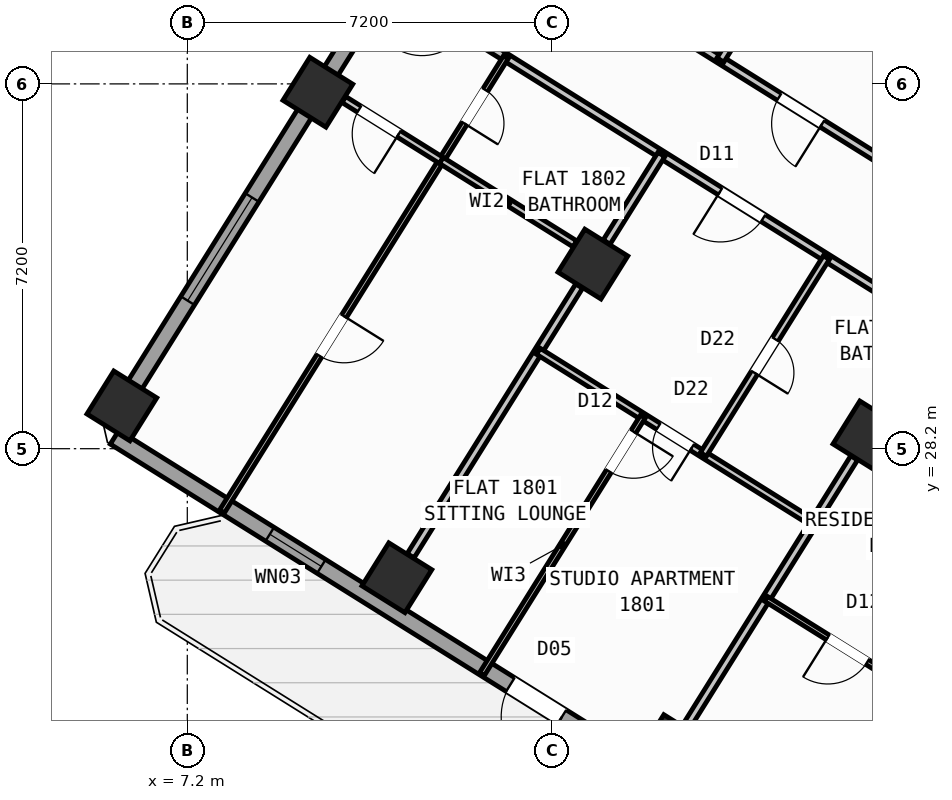
"""IFC4 building model, lengths in metres.
Left out: names, types, materials, properties, quantities, classifications, styles, units other than length and angle.
Written with IfcOpenShell. Run it as: python <this file> out.ifc"""

import sys

from ifc_helpers import new_model, si_unit, direction, frame, frame_2d, origin, origin_2d, place, context, subcontext, project, spatial, rectangle, hollow_rectangle, extrude, source, transform, mapped, element, fill, save


model = new_model("IFC4")
c1 = context("Model", 3, precision=1e-05, world=origin(), true_north=direction((0.0, 1.0)))
c2 = subcontext(c1, "Body", "Model", "MODEL_VIEW")
j1 = project(units=[si_unit("LENGTHUNIT", "METRE"), si_unit("PLANEANGLEUNIT", "RADIAN")], contexts=[c1])
p1 = place(None, origin())
s1 = spatial("IfcSite", under=j1, at=p1, CompositionType="ELEMENT")
p2 = place(p1, origin())
s2 = spatial("IfcBuilding", under=s1, at=p2, CompositionType="ELEMENT")
p3 = place(p2, frame((0.0, 0.0, 71.7)))
s3 = spatial("IfcBuildingStorey", under=s2, at=p3, CompositionType="ELEMENT", Elevation=71.7)
m1 = source(origin(), c2, "Body", "SweptSolid", [
    extrude(hollow_rectangle(XDim=1.0, YDim=1.0, WallThickness=0.04, at=origin_2d()), origin(), (0.0, 0.0, 1.0), 4.8),
])
for number, where, z_axis, x_axis in (
    (1, (20.632, 28.452, 0.0), (0.0, 0.0, 1.0), (-0.848, 0.53, 0.0)),
    (2, (16.764, 22.261, 0.0), (0.0, 0.0, 1.0), (-0.848, 0.53, 0.0)),
    (3, (15.205, 31.844, 0.0), (0.0, 0.0, 1.0), (-0.848, 0.53, 0.0)),
    (4, (11.336, 25.653, 0.0), (0.0, 0.0, 1.0), (-0.848, 0.53, 0.0)),
    (5, (9.777, 35.235, 0.0), (0.0, 0.0, 1.0), (-0.848, 0.53, 0.0)),
    (6, (5.909, 29.044, 0.0), (0.0, 0.0, 1.0), (-0.848, 0.53, 0.0)),
):
    element("IfcColumn", number, at=place(p3, frame(where, z_axis=z_axis, x_axis=x_axis)), inside=s3, PredefinedType="COLUMN", context=c2, shape_type="MappedRepresentation", body=[
        mapped(m1, transform((0.0, 0.0, 0.0), scale=1.0)),
    ])
p4 = place(p3, frame((31.76, 12.183, 0.0), z_axis=(0.0, 0.0, 1.0), x_axis=(-0.848047074256, 0.529920899612, 0.0)))
e7 = element("IfcWall", 7, at=p4, inside=s3, PredefinedType="STANDARD", context=c2, shape_type="SweptSolid", body=[
    extrude(rectangle(XDim=30.652, YDim=0.32, at=frame_2d((15.326, 0.0))), origin(), (0.0, 0.0, 1.0), 4.52),
])
p5 = place(p4, frame((20.241, 0.0, 0.0)))
e8 = element("IfcOpeningElement", 8, at=p5, cuts=e7, PredefinedType="OPENING", context=c2, shape_type="SweptSolid", body=[
    extrude(rectangle(XDim=1.2, YDim=2.15, at=frame_2d((0.6, 1.075))), frame((0.0, 0.17, 0.0), z_axis=(0.0, -1.0, 0.0), x_axis=(1.0, 0.0, 0.0)), (0.0, 0.0, 1.0), 0.34),
])
p6 = place(p4, frame((14.781, 0.0, 0.0)))
e9 = element("IfcOpeningElement", 9, at=p6, cuts=e7, PredefinedType="OPENING", context=c2, shape_type="SweptSolid", body=[
    extrude(rectangle(XDim=1.5, YDim=2.25, at=frame_2d((0.75, 1.125))), frame((0.0, 0.17, 0.0), z_axis=(0.0, -1.0, 0.0), x_axis=(1.0, 0.0, 0.0)), (0.0, 0.0, 1.0), 0.34),
])
p7 = place(p4, frame((1.84, 0.0, 0.75)))
e10 = element("IfcOpeningElement", 10, at=p7, cuts=e7, PredefinedType="OPENING", context=c2, shape_type="SweptSolid", body=[
    extrude(rectangle(XDim=2.4, YDim=1.6, at=frame_2d((1.2, 0.8))), frame((0.0, 0.17, 0.0), z_axis=(0.0, -1.0, 0.0), x_axis=(1.0, 0.0, 0.0)), (0.0, 0.0, 1.0), 0.34),
])
p8 = place(p4, frame((7.019, 0.0, 0.75)))
e11 = element("IfcOpeningElement", 11, at=p8, cuts=e7, PredefinedType="OPENING", context=c2, shape_type="SweptSolid", body=[
    extrude(rectangle(XDim=2.4, YDim=1.6, at=frame_2d((1.2, 0.8))), frame((0.0, 0.17, 0.0), z_axis=(0.0, -1.0, 0.0), x_axis=(1.0, 0.0, 0.0)), (0.0, 0.0, 1.0), 0.34),
])
p9 = place(p4, frame((25.841, 0.0, 0.95)))
e12 = element("IfcOpeningElement", 12, at=p9, cuts=e7, PredefinedType="OPENING", context=c2, shape_type="SweptSolid", body=[
    extrude(rectangle(XDim=1.2, YDim=1.4, at=frame_2d((0.6, 0.7))), frame((0.0, 0.17, 0.0), z_axis=(0.0, -1.0, 0.0), x_axis=(1.0, 0.0, 0.0)), (0.0, 0.0, 1.0), 0.34),
])
p10 = place(p3, frame((5.7, 28.71, 0.0), z_axis=(0.0, 0.0, 1.0), x_axis=(0.529923711467, 0.8480453172, 0.0)))
e13 = element("IfcWall", 13, at=p10, inside=s3, PredefinedType="STANDARD", context=c2, shape_type="SweptSolid", body=[
    extrude(rectangle(XDim=21.587, YDim=0.32, at=frame_2d((10.794, 0.0))), origin(), (0.0, 0.0, 1.0), 3.895),
])
p11 = place(p10, frame((2.844, 0.0, 0.75)))
e14 = element("IfcOpeningElement", 14, at=p11, cuts=e13, PredefinedType="OPENING", context=c2, shape_type="SweptSolid", body=[
    extrude(rectangle(XDim=2.4, YDim=1.6, at=frame_2d((1.2, 0.8))), frame((0.0, 0.17, 0.0), z_axis=(0.0, -1.0, 0.0), x_axis=(1.0, 0.0, 0.0)), (0.0, 0.0, 1.0), 0.34),
])
p12 = place(p3, frame((17.424, 47.083, 0.0), z_axis=(0.0, 0.0, 1.0), x_axis=(0.848049927979, -0.529916332693, 0.0)))
e15 = element("IfcWall", 15, at=p12, inside=s3, PredefinedType="STANDARD", context=c2, shape_type="SweptSolid", body=[
    extrude(rectangle(XDim=29.223, YDim=0.32, at=frame_2d((14.612, 0.0))), origin(), (0.0, 0.0, 1.0), 4.52),
])
p13 = place(p12, frame((3.339, 0.0, 0.0)))
e16 = element("IfcOpeningElement", 16, at=p13, cuts=e15, PredefinedType="OPENING", context=c2, shape_type="SweptSolid", body=[
    extrude(rectangle(XDim=1.05, YDim=2.15, at=frame_2d((0.525, 1.075))), frame((0.0, 0.17, 0.0), z_axis=(0.0, -1.0, 0.0), x_axis=(1.0, 0.0, 0.0)), (0.0, 0.0, 1.0), 0.34),
])
p14 = place(p12, frame((8.194, 0.0, 0.75)))
e17 = element("IfcOpeningElement", 17, at=p14, cuts=e15, PredefinedType="OPENING", context=c2, shape_type="SweptSolid", body=[
    extrude(rectangle(XDim=2.4, YDim=1.6, at=frame_2d((1.2, 0.8))), frame((0.0, 0.17, 0.0), z_axis=(0.0, -1.0, 0.0), x_axis=(1.0, 0.0, 0.0)), (0.0, 0.0, 1.0), 0.34),
])
p15 = place(p12, frame((22.226, 0.0, 0.85)))
e18 = element("IfcOpeningElement", 18, at=p15, cuts=e15, PredefinedType="OPENING", context=c2, shape_type="SweptSolid", body=[
    extrude(rectangle(XDim=1.8, YDim=1.5, at=frame_2d((0.9, 0.75))), frame((0.0, 0.17, 0.0), z_axis=(0.0, -1.0, 0.0), x_axis=(1.0, 0.0, 0.0)), (0.0, 0.0, 1.0), 0.34),
])
p16 = place(p12, frame((26.934, 0.0, 0.95)))
e19 = element("IfcOpeningElement", 19, at=p16, cuts=e15, PredefinedType="OPENING", context=c2, shape_type="SweptSolid", body=[
    extrude(rectangle(XDim=1.2, YDim=1.4, at=frame_2d((0.6, 0.7))), frame((0.0, 0.17, 0.0), z_axis=(0.0, -1.0, 0.0), x_axis=(1.0, 0.0, 0.0)), (0.0, 0.0, 1.0), 0.34),
])
p17 = place(p12, frame((14.636, 0.0, 1.0)))
e20 = element("IfcOpeningElement", 20, at=p17, cuts=e15, PredefinedType="OPENING", context=c2, shape_type="SweptSolid", body=[
    extrude(rectangle(XDim=0.9, YDim=1.25, at=frame_2d((0.45, 0.625))), frame((0.0, 0.17, 0.0), z_axis=(0.0, -1.0, 0.0), x_axis=(1.0, 0.0, 0.0)), (0.0, 0.0, 1.0), 0.34),
])
p18 = place(p3, frame((25.198, 28.606, 0.0), z_axis=(0.0, 0.0, 1.0), x_axis=(-0.529926497642, -0.848043576178, 0.0)))
e21 = element("IfcWall", 21, at=p18, inside=s3, PredefinedType="PARTITIONING", context=c2, shape_type="SweptSolid", body=[
    extrude(rectangle(XDim=10.3, YDim=0.16, at=frame_2d((5.15, 0.0))), origin(), (0.0, 0.0, 1.0), 4.51),
])
p19 = place(p3, frame((26.363, 30.472, 0.0), z_axis=(0.0, 0.0, 1.0), x_axis=(-0.848052408131, 0.529912363569, 0.0)))
e22 = element("IfcWall", 22, at=p19, inside=s3, PredefinedType="PARTITIONING", context=c2, shape_type="SweptSolid", body=[
    extrude(rectangle(XDim=16.73, YDim=0.16, at=frame_2d((8.365, 0.0))), origin(), (0.0, 0.0, 1.0), 4.51),
])
p20 = place(p19, frame((2.22, 0.0, 0.0)))
e23 = element("IfcOpeningElement", 23, at=p20, cuts=e22, PredefinedType="OPENING", context=c2, shape_type="SweptSolid", body=[
    extrude(rectangle(XDim=0.86, YDim=2.05, at=frame_2d((0.43, 1.025))), frame((0.0, 0.09, 0.0), z_axis=(0.0, -1.0, 0.0), x_axis=(1.0, 0.0, 0.0)), (0.0, 0.0, 1.0), 0.18),
])
p21 = place(p19, frame((7.82, 0.0, 0.0)))
e24 = element("IfcOpeningElement", 24, at=p21, cuts=e22, PredefinedType="OPENING", context=c2, shape_type="SweptSolid", body=[
    extrude(rectangle(XDim=1.0, YDim=2.1, at=frame_2d((0.5, 1.05))), frame((0.0, 0.09, 0.0), z_axis=(0.0, -1.0, 0.0), x_axis=(1.0, 0.0, 0.0)), (0.0, 0.0, 1.0), 0.18),
])
p22 = place(p19, frame((12.95, 0.0, 0.0)))
e25 = element("IfcOpeningElement", 25, at=p22, cuts=e22, PredefinedType="OPENING", context=c2, shape_type="SweptSolid", body=[
    extrude(rectangle(XDim=1.0, YDim=2.1, at=frame_2d((0.5, 1.05))), frame((0.0, 0.09, 0.0), z_axis=(0.0, -1.0, 0.0), x_axis=(1.0, 0.0, 0.0)), (0.0, 0.0, 1.0), 0.18),
])
p23 = place(p3, frame((25.198, 28.606, 0.0), z_axis=(0.0, 0.0, 1.0), x_axis=(-0.848052408131, 0.529912363569, 0.0)))
e26 = element("IfcWall", 26, at=p23, inside=s3, PredefinedType="PARTITIONING", context=c2, shape_type="SweptSolid", body=[
    extrude(rectangle(XDim=16.73, YDim=0.16, at=frame_2d((8.365, 0.0))), origin(), (0.0, 0.0, 1.0), 4.51),
])
p24 = place(p23, frame((1.395, 0.0, 0.0)))
e27 = element("IfcOpeningElement", 27, at=p24, cuts=e26, PredefinedType="OPENING", context=c2, shape_type="SweptSolid", body=[
    extrude(rectangle(XDim=1.0, YDim=2.1, at=frame_2d((0.5, 1.05))), frame((0.0, 0.09, 0.0), z_axis=(0.0, -1.0, 0.0), x_axis=(1.0, 0.0, 0.0)), (0.0, 0.0, 1.0), 0.18),
])
p25 = place(p23, frame((7.82, 0.0, 0.0)))
e28 = element("IfcOpeningElement", 28, at=p25, cuts=e26, PredefinedType="OPENING", context=c2, shape_type="SweptSolid", body=[
    extrude(rectangle(XDim=1.0, YDim=2.1, at=frame_2d((0.5, 1.05))), frame((0.0, 0.09, 0.0), z_axis=(0.0, -1.0, 0.0), x_axis=(1.0, 0.0, 0.0)), (0.0, 0.0, 1.0), 0.18),
])
p26 = place(p23, frame((14.76, 0.0, 0.0)))
e29 = element("IfcOpeningElement", 29, at=p26, cuts=e26, PredefinedType="OPENING", context=c2, shape_type="SweptSolid", body=[
    extrude(rectangle(XDim=1.0, YDim=2.1, at=frame_2d((0.5, 1.05))), frame((0.0, 0.09, 0.0), z_axis=(0.0, -1.0, 0.0), x_axis=(1.0, 0.0, 0.0)), (0.0, 0.0, 1.0), 0.18),
])
p27 = place(p3, frame((20.361, 28.018, 0.0), z_axis=(0.0, 0.0, 1.0), x_axis=(-0.529915015264, -0.848050751193, 0.0)))
e30 = element("IfcWall", 30, at=p27, inside=s3, PredefinedType="PARTITIONING", context=c2, shape_type="SweptSolid", body=[
    extrude(rectangle(XDim=6.276, YDim=0.16, at=frame_2d((3.138, 0.0))), origin(), (0.0, 0.0, 1.0), 3.895),
])
p28 = place(p3, frame((21.837, 23.228, 0.0), z_axis=(0.0, 0.0, 1.0), x_axis=(-0.84803087207, 0.529946827537, 0.0)))
e31 = element("IfcWall", 31, at=p28, inside=s3, PredefinedType="PARTITIONING", context=c2, shape_type="SweptSolid", body=[
    extrude(rectangle(XDim=3.79, YDim=0.11, at=frame_2d((1.895, 0.0))), origin(), (0.0, 0.0, 1.0), 4.51),
])
p29 = place(p28, frame((1.435, 0.0, 0.0)))
e32 = element("IfcOpeningElement", 32, at=p29, cuts=e31, PredefinedType="OPENING", context=c2, shape_type="SweptSolid", body=[
    extrude(rectangle(XDim=0.92, YDim=2.08, at=frame_2d((0.46, 1.04))), frame((0.0, 0.065, 0.0), z_axis=(0.0, -1.0, 0.0), x_axis=(1.0, 0.0, 0.0)), (0.0, 0.0, 1.0), 0.13),
])
p30 = place(p3, frame((16.556, 34.006, 0.0), z_axis=(0.0, 0.0, 1.0), x_axis=(-0.529966635742, -0.848018493313, 0.0)))
e33 = element("IfcWall", 33, at=p30, inside=s3, PredefinedType="PARTITIONING", context=c2, shape_type="SweptSolid", body=[
    extrude(rectangle(XDim=2.038, YDim=0.16, at=frame_2d((1.019, 0.0))), origin(), (0.0, 0.0, 1.0), 3.895),
])
p31 = place(p3, frame((14.933, 31.409, 0.0), z_axis=(0.0, 0.0, 1.0), x_axis=(-0.529897533635, -0.848061674554, 0.0)))
e34 = element("IfcWall", 34, at=p31, inside=s3, PredefinedType="PARTITIONING", context=c2, shape_type="SweptSolid", body=[
    extrude(rectangle(XDim=6.276, YDim=0.16, at=frame_2d((3.138, 0.0))), origin(), (0.0, 0.0, 1.0), 3.895),
])
p32 = place(p3, frame((19.556, 26.73, 0.0), z_axis=(0.0, 0.0, 1.0), x_axis=(-0.848049732085, 0.529916646191, 0.0)))
e35 = element("IfcWall", 35, at=p32, inside=s3, PredefinedType="PLUMBINGWALL", context=c2, shape_type="SweptSolid", body=[
    extrude(rectangle(XDim=6.4, YDim=0.14, at=frame_2d((3.2, 0.0))), origin(), (0.0, 0.0, 1.0), 4.51),
])
p33 = place(p32, frame((2.824, 0.0, 0.0)))
e36 = element("IfcOpeningElement", 36, at=p33, cuts=e35, PredefinedType="OPENING", context=c2, shape_type="SweptSolid", body=[
    extrude(rectangle(XDim=0.78, YDim=2.05, at=frame_2d((0.39, 1.025))), frame((0.0, 0.08, 0.0), z_axis=(0.0, -1.0, 0.0), x_axis=(1.0, 0.0, 0.0)), (0.0, 0.0, 1.0), 0.16),
])
p34 = place(p3, frame((19.812, 31.971, 0.0), z_axis=(0.0, 0.0, 1.0), x_axis=(-0.529917480809, -0.848049210561, 0.0)))
e37 = element("IfcWall", 37, at=p34, inside=s3, PredefinedType="PLUMBINGWALL", context=c2, shape_type="SweptSolid", body=[
    extrude(rectangle(XDim=4.58, YDim=0.14, at=frame_2d((2.29, 0.0))), origin(), (0.0, 0.0, 1.0), 4.51),
])
p35 = place(p34, frame((1.9, 0.0, 0.0)))
e38 = element("IfcOpeningElement", 38, at=p35, cuts=e37, PredefinedType="OPENING", context=c2, shape_type="SweptSolid", body=[
    extrude(rectangle(XDim=0.78, YDim=2.05, at=frame_2d((0.39, 1.025))), frame((0.0, 0.08, 0.0), z_axis=(0.0, -1.0, 0.0), x_axis=(1.0, 0.0, 0.0)), (0.0, 0.0, 1.0), 0.16),
])
p36 = place(p3, frame((16.191, 28.833, 0.0), z_axis=(0.0, 0.0, 1.0), x_axis=(-0.529900017123, -0.848060122782, 0.0)))
e39 = element("IfcWall", 39, at=p36, inside=s3, PredefinedType="PARTITIONING", context=c2, shape_type="SweptSolid", body=[
    extrude(rectangle(XDim=5.99, YDim=0.11, at=frame_2d((2.995, 0.0))), origin(), (0.0, 0.0, 1.0), 4.51),
])
p37 = place(p36, frame((0.35, 0.0, 0.0)))
e40 = element("IfcOpeningElement", 40, at=p37, cuts=e39, PredefinedType="OPENING", context=c2, shape_type="SweptSolid", body=[
    extrude(rectangle(XDim=0.92, YDim=2.08, at=frame_2d((0.46, 1.04))), frame((0.0, 0.065, 0.0), z_axis=(0.0, -1.0, 0.0), x_axis=(1.0, 0.0, 0.0)), (0.0, 0.0, 1.0), 0.13),
])
p38 = place(p3, frame((13.486, 35.924, 0.0), z_axis=(0.0, 0.0, 1.0), x_axis=(-0.529924195719, -0.848045014602, 0.0)))
e41 = element("IfcWall", 41, at=p38, inside=s3, PredefinedType="PARTITIONING", context=c2, shape_type="SweptSolid", body=[
    extrude(rectangle(XDim=10.57, YDim=0.11, at=frame_2d((5.285, 0.0))), origin(), (0.0, 0.0, 1.0), 4.51),
])
p39 = place(p38, frame((0.76, 0.0, 0.0)))
e42 = element("IfcOpeningElement", 42, at=p39, cuts=e41, PredefinedType="OPENING", context=c2, shape_type="SweptSolid", body=[
    extrude(rectangle(XDim=0.78, YDim=2.05, at=frame_2d((0.39, 1.025))), frame((0.0, 0.065, 0.0), z_axis=(0.0, -1.0, 0.0), x_axis=(1.0, 0.0, 0.0)), (0.0, 0.0, 1.0), 0.13),
])
p40 = place(p38, frame((6.025, 0.0, 0.0)))
e43 = element("IfcOpeningElement", 43, at=p40, cuts=e41, PredefinedType="OPENING", context=c2, shape_type="SweptSolid", body=[
    extrude(rectangle(XDim=0.92, YDim=2.08, at=frame_2d((0.46, 1.04))), frame((0.0, 0.065, 0.0), z_axis=(0.0, -1.0, 0.0), x_axis=(1.0, 0.0, 0.0)), (0.0, 0.0, 1.0), 0.13),
])
p41 = place(p3, frame((12.214, 33.889, 0.0), z_axis=(0.0, 0.0, 1.0), x_axis=(-0.848082963347, 0.529863460979, 0.0)))
e44 = element("IfcWall", 44, at=p41, inside=s3, PredefinedType="PLUMBINGWALL", context=c2, shape_type="SweptSolid", body=[
    extrude(rectangle(XDim=2.268, YDim=0.14, at=frame_2d((1.134, 0.0))), origin(), (0.0, 0.0, 1.0), 3.895),
])
p42 = place(p41, frame((0.99, 0.0, 0.0)))
e45 = element("IfcOpeningElement", 45, at=p42, cuts=e44, PredefinedType="OPENING", context=c2, shape_type="SweptSolid", body=[
    extrude(rectangle(XDim=0.92, YDim=2.08, at=frame_2d((0.46, 1.04))), frame((0.0, 0.08, 0.0), z_axis=(0.0, -1.0, 0.0), x_axis=(1.0, 0.0, 0.0)), (0.0, 0.0, 1.0), 0.16),
])
p43 = place(p3, frame((14.85, 32.242, 0.0), z_axis=(0.0, 0.0, 1.0), x_axis=(-0.848051256418, 0.529914206724, 0.0)))
e46 = element("IfcWall", 46, at=p43, inside=s3, PredefinedType="PLUMBINGWALL", context=c2, shape_type="SweptSolid", body=[
    extrude(rectangle(XDim=3.108, YDim=0.14, at=frame_2d((1.554, 0.0))), origin(), (0.0, 0.0, 1.0), 3.895),
])
p44 = place(p3, frame((18.802, 37.6, 0.0), z_axis=(0.0, 0.0, 1.0), x_axis=(-0.529880479764, -0.848072330149, 0.0)))
e47 = element("IfcWall", 47, at=p44, inside=s3, PredefinedType="PARTITIONING", context=c2, shape_type="SweptSolid", body=[
    extrude(rectangle(XDim=2.038, YDim=0.16, at=frame_2d((1.019, 0.0))), origin(), (0.0, 0.0, 1.0), 3.895),
])
m2 = source(origin(), c2, "Body", "SweptSolid", [
    extrude(rectangle(XDim=1.2, YDim=2.15, at=frame_2d((0.6, 1.075))), frame((0.0, 0.025, 0.0), z_axis=(0.0, -1.0, 0.0), x_axis=(1.0, 0.0, 0.0)), (0.0, 0.0, 1.0), 0.05),
])
p45 = place(p5, origin())
e48 = element("IfcDoor", 48, at=p45, inside=s3, OperationType="SINGLE_SWING_LEFT", PredefinedType="DOOR", context=c2, shape_type="MappedRepresentation", body=[
    mapped(m2, transform((0.0, 0.0, 0.0), scale=1.0)),
])
fill(e8, e48)
m3 = source(origin(), c2, "Body", "SweptSolid", [
    extrude(rectangle(XDim=1.2, YDim=1.4, at=frame_2d((0.6, 0.7))), frame((0.0, 0.03, 0.0), z_axis=(0.0, -1.0, 0.0), x_axis=(1.0, 0.0, 0.0)), (0.0, 0.0, 1.0), 0.06),
])
p46 = place(p9, origin())
e49 = element("IfcWindow", 49, at=p46, inside=s3, PartitioningType="SINGLE_PANEL", PredefinedType="WINDOW", context=c2, shape_type="MappedRepresentation", body=[
    mapped(m3, transform((0.0, 0.0, 0.0), scale=1.0)),
])
fill(e12, e49)
m4 = source(origin(), c2, "Body", "SweptSolid", [
    extrude(rectangle(XDim=2.4, YDim=1.6, at=frame_2d((1.2, 0.8))), frame((0.0, 0.03, 0.0), z_axis=(0.0, -1.0, 0.0), x_axis=(1.0, 0.0, 0.0)), (0.0, 0.0, 1.0), 0.06),
])
p47 = place(p11, origin())
e50 = element("IfcWindow", 50, at=p47, inside=s3, PartitioningType="SINGLE_PANEL", PredefinedType="WINDOW", context=c2, shape_type="MappedRepresentation", body=[
    mapped(m4, transform((0.0, 0.0, 0.0), scale=1.0)),
])
fill(e14, e50)
m5 = source(origin(), c2, "Body", "SweptSolid", [
    extrude(rectangle(XDim=0.92, YDim=2.08, at=frame_2d((0.46, 1.04))), frame((0.0, 0.025, 0.0), z_axis=(0.0, -1.0, 0.0), x_axis=(1.0, 0.0, 0.0)), (0.0, 0.0, 1.0), 0.05),
])
p48 = place(p29, origin())
e51 = element("IfcDoor", 51, at=p48, inside=s3, OperationType="SINGLE_SWING_RIGHT", PredefinedType="DOOR", context=c2, shape_type="MappedRepresentation", body=[
    mapped(m5, transform((0.0, 0.0, 0.0), scale=1.0)),
])
fill(e32, e51)
p49 = place(p37, origin())
e52 = element("IfcDoor", 52, at=p49, inside=s3, OperationType="SINGLE_SWING_LEFT", PredefinedType="DOOR", context=c2, shape_type="MappedRepresentation", body=[
    mapped(m5, transform((0.0, 0.0, 0.0), scale=1.0)),
])
fill(e40, e52)
m6 = source(origin(), c2, "Body", "SweptSolid", [
    extrude(rectangle(XDim=1.0, YDim=2.1, at=frame_2d((0.5, 1.05))), frame((0.0, 0.025, 0.0), z_axis=(0.0, -1.0, 0.0), x_axis=(1.0, 0.0, 0.0)), (0.0, 0.0, 1.0), 0.05),
])
p50 = place(p25, origin())
e53 = element("IfcDoor", 53, at=p50, inside=s3, OperationType="SINGLE_SWING_RIGHT", PredefinedType="DOOR", context=c2, shape_type="MappedRepresentation", body=[
    mapped(m6, transform((0.0, 0.0, 0.0), scale=1.0)),
])
fill(e28, e53)
m7 = source(origin(), c2, "Body", "SweptSolid", [
    extrude(rectangle(XDim=0.78, YDim=2.05, at=frame_2d((0.39, 1.025))), frame((0.0, 0.025, 0.0), z_axis=(0.0, -1.0, 0.0), x_axis=(1.0, 0.0, 0.0)), (0.0, 0.0, 1.0), 0.05),
])
p51 = place(p33, origin())
e54 = element("IfcDoor", 54, at=p51, inside=s3, OperationType="SINGLE_SWING_LEFT", PredefinedType="DOOR", context=c2, shape_type="MappedRepresentation", body=[
    mapped(m7, transform((0.0, 0.0, 0.0), scale=1.0)),
])
fill(e36, e54)
p52 = place(p35, origin())
e55 = element("IfcDoor", 55, at=p52, inside=s3, OperationType="SINGLE_SWING_RIGHT", PredefinedType="DOOR", context=c2, shape_type="MappedRepresentation", body=[
    mapped(m7, transform((0.0, 0.0, 0.0), scale=1.0)),
])
fill(e38, e55)
p53 = place(p42, origin())
e56 = element("IfcDoor", 56, at=p53, inside=s3, OperationType="SINGLE_SWING_LEFT", PredefinedType="DOOR", context=c2, shape_type="MappedRepresentation", body=[
    mapped(m5, transform((0.0, 0.0, 0.0), scale=1.0)),
])
fill(e45, e56)
p54 = place(p39, origin())
e57 = element("IfcDoor", 57, at=p54, inside=s3, OperationType="SINGLE_SWING_RIGHT", PredefinedType="DOOR", context=c2, shape_type="MappedRepresentation", body=[
    mapped(m7, transform((0.0, 0.0, 0.0), scale=1.0)),
])
fill(e42, e57)
p55 = place(p40, origin())
e58 = element("IfcDoor", 58, at=p55, inside=s3, OperationType="SINGLE_SWING_LEFT", PredefinedType="DOOR", context=c2, shape_type="MappedRepresentation", body=[
    mapped(m5, transform((0.0, 0.0, 0.0), scale=1.0)),
])
fill(e43, e58)
p56 = place(p21, origin())
e59 = element("IfcDoor", 59, at=p56, inside=s3, OperationType="SINGLE_SWING_LEFT", PredefinedType="DOOR", context=c2, shape_type="MappedRepresentation", body=[
    mapped(m6, transform((0.0, 0.0, 0.0), scale=1.0)),
])
fill(e24, e59)
save(model, sys.argv[1])
